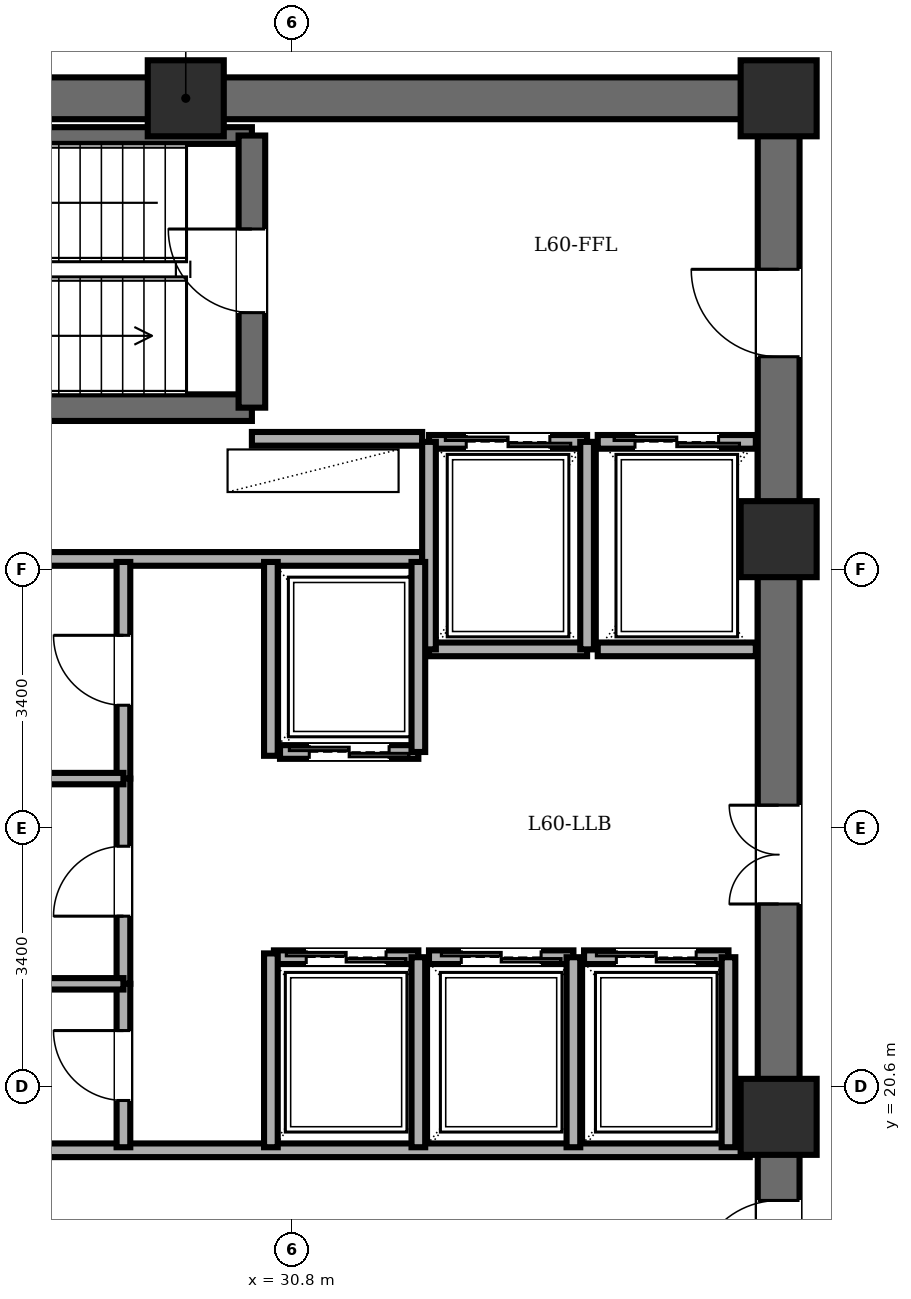
"""IFC4 building model, lengths in metres.
Left out: names, types, materials, properties, quantities, classifications, styles, units other than length and angle.
Written with IfcOpenShell. Run it as: python <this file> out.ifc"""

import sys

from ifc_helpers import new_model, si_unit, direction, frame, frame_2d, origin, origin_2d, place, context, subcontext, project, spatial, rectangle, extrude, element, fill, save


model = new_model("IFC4")
c1 = context("Model", 3, precision=1e-05, world=origin(), true_north=direction((0.0, 1.0)))
c2 = subcontext(c1, "Body", "Model", "MODEL_VIEW")
j1 = project(units=[si_unit("LENGTHUNIT", "METRE"), si_unit("PLANEANGLEUNIT", "RADIAN")], contexts=[c1])
p1 = place(None, origin())
s1 = spatial("IfcSite", under=j1, at=p1, CompositionType="ELEMENT")
p2 = place(p1, origin())
s2 = spatial("IfcBuilding", under=s1, at=p2, CompositionType="ELEMENT")
p3 = place(p2, frame((0.0, 0.0, 230.1)))
s3 = spatial("IfcBuildingStorey", under=s2, at=p3, CompositionType="ELEMENT", Elevation=230.1)
for number, where, z_axis, x_axis in (
    (1, (37.2, 20.2, 0.0), (0.0, 0.0, 1.0), (1.0, 0.0, 0.0)),
    (2, (37.2, 27.8, 0.0), (0.0, 0.0, 1.0), (1.0, 0.0, 0.0)),
    (3, (37.2, 33.6, 0.0), (0.0, 0.0, 1.0), (1.0, 0.0, 0.0)),
    (4, (29.4, 33.6, 0.0), (0.0, 0.0, 1.0), (1.0, 0.0, 0.0)),
):
    element("IfcColumn", number, at=place(p3, frame(where, z_axis=z_axis, x_axis=x_axis)), inside=s3, PredefinedType="COLUMN", context=c2, shape_type="SweptSolid", body=[
        extrude(rectangle(XDim=1.0, YDim=1.0, at=origin_2d()), origin(), (0.0, 0.0, 1.0), 3.6),
    ])
p4 = place(p3, frame((21.6, 33.6, 0.0), z_axis=(0.0, 0.0, 1.0), x_axis=(1.0, 0.0, 0.0)))
e5 = element("IfcWall", 5, at=p4, inside=s3, PredefinedType="SHEAR", context=c2, shape_type="SweptSolid", body=[
    extrude(rectangle(XDim=15.6, YDim=0.55, at=frame_2d((7.8, 0.0))), origin(), (0.0, 0.0, 1.0), 3.4),
])
p5 = place(p3, frame((37.2, 14.4, 0.0), z_axis=(0.0, 0.0, 1.0), x_axis=(0.0, 1.0, 0.0)))
e6 = element("IfcWall", 6, at=p5, inside=s3, PredefinedType="SHEAR", context=c2, shape_type="SweptSolid", body=[
    extrude(rectangle(XDim=19.2, YDim=0.55, at=frame_2d((9.6, 0.0))), origin(), (0.0, 0.0, 1.0), 3.4),
])
p6 = place(p5, frame((15.8, 0.0, 0.0)))
e7 = element("IfcOpeningElement", 7, at=p6, cuts=e6, PredefinedType="OPENING", context=c2, shape_type="SweptSolid", body=[
    extrude(rectangle(XDim=1.15, YDim=2.15, at=frame_2d((0.575, 1.075))), frame((0.0, 0.285, 0.0), z_axis=(0.0, -1.0, 0.0), x_axis=(1.0, 0.0, 0.0)), (0.0, 0.0, 1.0), 0.57),
])
p7 = place(p5, frame((3.6, 0.0, 0.0)))
e8 = element("IfcOpeningElement", 8, at=p7, cuts=e6, PredefinedType="OPENING", context=c2, shape_type="SweptSolid", body=[
    extrude(rectangle(XDim=1.1, YDim=2.15, at=frame_2d((0.55, 1.075))), frame((0.0, 0.285, 0.0), z_axis=(0.0, -1.0, 0.0), x_axis=(1.0, 0.0, 0.0)), (0.0, 0.0, 1.0), 0.57),
])
p8 = place(p5, frame((8.6, 0.0, 0.0)))
e9 = element("IfcOpeningElement", 9, at=p8, cuts=e6, PredefinedType="OPENING", context=c2, shape_type="SweptSolid", body=[
    extrude(rectangle(XDim=1.3, YDim=2.2, at=frame_2d((0.65, 1.1))), frame((0.0, 0.285, 0.0), z_axis=(0.0, -1.0, 0.0), x_axis=(1.0, 0.0, 0.0)), (0.0, 0.0, 1.0), 0.57),
])
p9 = place(p3, frame((22.48, 29.53, 0.0), z_axis=(0.0, 0.0, 1.0), x_axis=(1.0, 0.0, 0.0)))
e10 = element("IfcWall", 10, at=p9, inside=s3, PredefinedType="SOLIDWALL", context=c2, shape_type="SweptSolid", body=[
    extrude(rectangle(XDim=7.79, YDim=0.35, at=frame_2d((3.895, 0.0))), origin(), (0.0, 0.0, 1.0), 3.4),
])
p10 = place(p3, frame((22.48, 33.11, 0.0), z_axis=(0.0, 0.0, 1.0), x_axis=(1.0, 0.0, 0.0)))
e11 = element("IfcWall", 11, at=p10, inside=s3, PredefinedType="PARTITIONING", context=c2, shape_type="SweptSolid", body=[
    extrude(rectangle(XDim=7.79, YDim=0.22, at=frame_2d((3.895, 0.0))), origin(), (0.0, 0.0, 1.0), 3.4),
])
p11 = place(p3, frame((30.27, 29.53, 0.0), z_axis=(0.0, 0.0, 1.0), x_axis=(0.0, 1.0, 0.0)))
e12 = element("IfcWall", 12, at=p11, inside=s3, PredefinedType="SOLIDWALL", context=c2, shape_type="SweptSolid", body=[
    extrude(rectangle(XDim=3.58, YDim=0.35, at=frame_2d((1.79, 0.0))), origin(), (0.0, 0.0, 1.0), 3.4),
])
p12 = place(p11, frame((1.25, 0.0, 0.0)))
e13 = element("IfcOpeningElement", 13, at=p12, cuts=e12, PredefinedType="OPENING", context=c2, shape_type="SweptSolid", body=[
    extrude(rectangle(XDim=1.1, YDim=2.15, at=frame_2d((0.55, 1.075))), frame((0.0, 0.185, 0.0), z_axis=(0.0, -1.0, 0.0), x_axis=(1.0, 0.0, 0.0)), (0.0, 0.0, 1.0), 0.37),
])
p13 = place(p3, frame((30.27, 29.12, 0.0), z_axis=(0.0, 0.0, 1.0), x_axis=(1.0, 0.0, 0.0)))
e14 = element("IfcWall", 14, at=p13, inside=s3, PredefinedType="PARTITIONING", context=c2, shape_type="SweptSolid", body=[
    extrude(rectangle(XDim=2.24, YDim=0.18, at=frame_2d((1.12, 0.0))), origin(), (0.0, 0.0, 1.0), 3.4),
])
p14 = place(p3, frame((21.95, 27.54, 0.0), z_axis=(0.0, 0.0, 1.0), x_axis=(1.0, 0.0, 0.0)))
e15 = element("IfcWall", 15, at=p14, inside=s3, PredefinedType="PARTITIONING", context=c2, shape_type="SweptSolid", body=[
    extrude(rectangle(XDim=10.56, YDim=0.18, at=frame_2d((5.28, 0.0))), origin(), (0.0, 0.0, 1.0), 3.4),
])
p15 = place(p3, frame((21.95, 19.76, 0.0), z_axis=(0.0, 0.0, 1.0), x_axis=(1.0, 0.0, 0.0)))
e16 = element("IfcWall", 16, at=p15, inside=s3, PredefinedType="PARTITIONING", context=c2, shape_type="SweptSolid", body=[
    extrude(rectangle(XDim=14.87, YDim=0.18, at=frame_2d((7.435, 0.0))), origin(), (0.0, 0.0, 1.0), 3.4),
])
p16 = place(p3, frame((32.6, 29.08, 0.0), z_axis=(0.0, 0.0, 1.0), x_axis=(1.0, 0.0, 0.0)))
e17 = element("IfcWall", 17, at=p16, inside=s3, PredefinedType="PARTITIONING", context=c2, shape_type="SweptSolid", body=[
    extrude(rectangle(XDim=2.08, YDim=0.18, at=frame_2d((1.04, 0.0))), origin(), (0.0, 0.0, 1.0), 3.4),
])
p17 = place(p16, frame((0.49, 0.0, 0.0)))
e18 = element("IfcOpeningElement", 18, at=p17, cuts=e17, PredefinedType="OPENING", context=c2, shape_type="SweptSolid", body=[
    extrude(rectangle(XDim=1.1, YDim=2.2, at=frame_2d((0.55, 1.1))), frame((0.0, 0.1, 0.0), z_axis=(0.0, -1.0, 0.0), x_axis=(1.0, 0.0, 0.0)), (0.0, 0.0, 1.0), 0.2),
])
p18 = place(p3, frame((34.68, 26.35, 0.0), z_axis=(0.0, 0.0, 1.0), x_axis=(-1.0, 0.0, 0.0)))
e19 = element("IfcWall", 19, at=p18, inside=s3, PredefinedType="PARTITIONING", context=c2, shape_type="SweptSolid", body=[
    extrude(rectangle(XDim=2.08, YDim=0.18, at=frame_2d((1.04, 0.0))), origin(), (0.0, 0.0, 1.0), 3.4),
])
for number, where, z_axis, x_axis in (
    (20, (34.68, 26.35, 0.0), (0.0, 0.0, 1.0), (0.0, 1.0, 0.0)),
    (21, (32.6, 29.08, 0.0), (0.0, 0.0, 1.0), (0.0, -1.0, 0.0)),
):
    element("IfcWall", number, at=place(p3, frame(where, z_axis=z_axis, x_axis=x_axis)), inside=s3, PredefinedType="PARTITIONING", context=c2, shape_type="SweptSolid", body=[
        extrude(rectangle(XDim=2.73, YDim=0.18, at=frame_2d((1.365, 0.0))), origin(), (0.0, 0.0, 1.0), 3.4),
    ])
p19 = place(p3, frame((34.82, 29.08, 0.0), z_axis=(0.0, 0.0, 1.0), x_axis=(1.0, 0.0, 0.0)))
e22 = element("IfcWall", 22, at=p19, inside=s3, PredefinedType="PARTITIONING", context=c2, shape_type="SweptSolid", body=[
    extrude(rectangle(XDim=2.08, YDim=0.18, at=frame_2d((1.04, 0.0))), origin(), (0.0, 0.0, 1.0), 3.4),
])
p20 = place(p19, frame((0.49, 0.0, 0.0)))
e23 = element("IfcOpeningElement", 23, at=p20, cuts=e22, PredefinedType="OPENING", context=c2, shape_type="SweptSolid", body=[
    extrude(rectangle(XDim=1.1, YDim=2.2, at=frame_2d((0.55, 1.1))), frame((0.0, 0.1, 0.0), z_axis=(0.0, -1.0, 0.0), x_axis=(1.0, 0.0, 0.0)), (0.0, 0.0, 1.0), 0.2),
])
p21 = place(p3, frame((36.9, 26.35, 0.0), z_axis=(0.0, 0.0, 1.0), x_axis=(-1.0, 0.0, 0.0)))
e24 = element("IfcWall", 24, at=p21, inside=s3, PredefinedType="PARTITIONING", context=c2, shape_type="SweptSolid", body=[
    extrude(rectangle(XDim=2.08, YDim=0.18, at=frame_2d((1.04, 0.0))), origin(), (0.0, 0.0, 1.0), 3.4),
])
p22 = place(p3, frame((32.46, 25.0, 0.0), z_axis=(0.0, 0.0, 1.0), x_axis=(-1.0, 0.0, 0.0)))
e25 = element("IfcWall", 25, at=p22, inside=s3, PredefinedType="PARTITIONING", context=c2, shape_type="SweptSolid", body=[
    extrude(rectangle(XDim=1.82, YDim=0.18, at=frame_2d((0.91, 0.0))), origin(), (0.0, 0.0, 1.0), 3.4),
])
p23 = place(p22, frame((0.385, 0.0, 0.0)))
e26 = element("IfcOpeningElement", 26, at=p23, cuts=e25, PredefinedType="OPENING", context=c2, shape_type="SweptSolid", body=[
    extrude(rectangle(XDim=1.05, YDim=2.2, at=frame_2d((0.525, 1.1))), frame((0.0, 0.1, 0.0), z_axis=(0.0, -1.0, 0.0), x_axis=(1.0, 0.0, 0.0)), (0.0, 0.0, 1.0), 0.2),
])
p24 = place(p3, frame((32.46, 25.0, 0.0), z_axis=(0.0, 0.0, 1.0), x_axis=(0.0, 1.0, 0.0)))
e27 = element("IfcWall", 27, at=p24, inside=s3, PredefinedType="PARTITIONING", context=c2, shape_type="SweptSolid", body=[
    extrude(rectangle(XDim=2.5, YDim=0.18, at=frame_2d((1.25, 0.0))), origin(), (0.0, 0.0, 1.0), 3.4),
])
p25 = place(p3, frame((30.56, 22.3, 0.0), z_axis=(0.0, 0.0, 1.0), x_axis=(1.0, 0.0, 0.0)))
e28 = element("IfcWall", 28, at=p25, inside=s3, PredefinedType="PARTITIONING", context=c2, shape_type="SweptSolid", body=[
    extrude(rectangle(XDim=1.9, YDim=0.18, at=frame_2d((0.95, 0.0))), origin(), (0.0, 0.0, 1.0), 3.4),
])
p26 = place(p25, frame((0.425, 0.0, 0.0)))
e29 = element("IfcOpeningElement", 29, at=p26, cuts=e28, PredefinedType="OPENING", context=c2, shape_type="SweptSolid", body=[
    extrude(rectangle(XDim=1.05, YDim=2.2, at=frame_2d((0.525, 1.1))), frame((0.0, 0.1, 0.0), z_axis=(0.0, -1.0, 0.0), x_axis=(1.0, 0.0, 0.0)), (0.0, 0.0, 1.0), 0.2),
])
p27 = place(p3, frame((32.46, 19.8, 0.0), z_axis=(0.0, 0.0, 1.0), x_axis=(0.0, 1.0, 0.0)))
e30 = element("IfcWall", 30, at=p27, inside=s3, PredefinedType="PARTITIONING", context=c2, shape_type="SweptSolid", body=[
    extrude(rectangle(XDim=2.5, YDim=0.18, at=frame_2d((1.25, 0.0))), origin(), (0.0, 0.0, 1.0), 3.4),
])
p28 = place(p3, frame((32.6, 22.3, 0.0), z_axis=(0.0, 0.0, 1.0), x_axis=(1.0, 0.0, 0.0)))
e31 = element("IfcWall", 31, at=p28, inside=s3, PredefinedType="PARTITIONING", context=c2, shape_type="SweptSolid", body=[
    extrude(rectangle(XDim=1.9, YDim=0.18, at=frame_2d((0.95, 0.0))), origin(), (0.0, 0.0, 1.0), 3.4),
])
p29 = place(p28, frame((0.425, 0.0, 0.0)))
e32 = element("IfcOpeningElement", 32, at=p29, cuts=e31, PredefinedType="OPENING", context=c2, shape_type="SweptSolid", body=[
    extrude(rectangle(XDim=1.05, YDim=2.2, at=frame_2d((0.525, 1.1))), frame((0.0, 0.1, 0.0), z_axis=(0.0, -1.0, 0.0), x_axis=(1.0, 0.0, 0.0)), (0.0, 0.0, 1.0), 0.2),
])
p30 = place(p3, frame((34.5, 19.8, 0.0), z_axis=(0.0, 0.0, 1.0), x_axis=(0.0, 1.0, 0.0)))
e33 = element("IfcWall", 33, at=p30, inside=s3, PredefinedType="PARTITIONING", context=c2, shape_type="SweptSolid", body=[
    extrude(rectangle(XDim=2.5, YDim=0.18, at=frame_2d((1.25, 0.0))), origin(), (0.0, 0.0, 1.0), 3.4),
])
p31 = place(p3, frame((34.64, 22.3, 0.0), z_axis=(0.0, 0.0, 1.0), x_axis=(1.0, 0.0, 0.0)))
e34 = element("IfcWall", 34, at=p31, inside=s3, PredefinedType="PARTITIONING", context=c2, shape_type="SweptSolid", body=[
    extrude(rectangle(XDim=1.9, YDim=0.18, at=frame_2d((0.95, 0.0))), origin(), (0.0, 0.0, 1.0), 3.4),
])
p32 = place(p31, frame((0.425, 0.0, 0.0)))
e35 = element("IfcOpeningElement", 35, at=p32, cuts=e34, PredefinedType="OPENING", context=c2, shape_type="SweptSolid", body=[
    extrude(rectangle(XDim=1.05, YDim=2.2, at=frame_2d((0.525, 1.1))), frame((0.0, 0.1, 0.0), z_axis=(0.0, -1.0, 0.0), x_axis=(1.0, 0.0, 0.0)), (0.0, 0.0, 1.0), 0.2),
])
p33 = place(p3, frame((36.54, 19.8, 0.0), z_axis=(0.0, 0.0, 1.0), x_axis=(0.0, 1.0, 0.0)))
e36 = element("IfcWall", 36, at=p33, inside=s3, PredefinedType="PARTITIONING", context=c2, shape_type="SweptSolid", body=[
    extrude(rectangle(XDim=2.5, YDim=0.18, at=frame_2d((1.25, 0.0))), origin(), (0.0, 0.0, 1.0), 3.4),
])
for number, where, z_axis, x_axis in (
    (37, (30.52, 24.95, 0.0), (0.0, 0.0, 1.0), (0.0, 1.0, 0.0)),
    (38, (30.52, 19.8, 0.0), (0.0, 0.0, 1.0), (0.0, 1.0, 0.0)),
):
    element("IfcWall", number, at=place(p3, frame(where, z_axis=z_axis, x_axis=x_axis)), inside=s3, PredefinedType="PARTITIONING", context=c2, shape_type="SweptSolid", body=[
        extrude(rectangle(XDim=2.55, YDim=0.18, at=frame_2d((1.275, 0.0))), origin(), (0.0, 0.0, 1.0), 3.4),
    ])
p34 = place(p3, frame((28.58, 24.65, 0.0), z_axis=(0.0, 0.0, 1.0), x_axis=(0.0, 1.0, 0.0)))
e39 = element("IfcWall", 39, at=p34, inside=s3, PredefinedType="PARTITIONING", context=c2, shape_type="SweptSolid", body=[
    extrude(rectangle(XDim=2.85, YDim=0.18, at=frame_2d((1.425, 0.0))), origin(), (0.0, 0.0, 1.0), 3.4),
])
p35 = place(p34, frame((0.965, 0.0, 0.0)))
e40 = element("IfcOpeningElement", 40, at=p35, cuts=e39, PredefinedType="OPENING", context=c2, shape_type="SweptSolid", body=[
    extrude(rectangle(XDim=0.92, YDim=2.1, at=frame_2d((0.46, 1.05))), frame((0.0, 0.1, 0.0), z_axis=(0.0, -1.0, 0.0), x_axis=(1.0, 0.0, 0.0)), (0.0, 0.0, 1.0), 0.2),
])
p36 = place(p3, frame((28.58, 21.95, 0.0), z_axis=(0.0, 0.0, 1.0), x_axis=(0.0, 1.0, 0.0)))
e41 = element("IfcWall", 41, at=p36, inside=s3, PredefinedType="PARTITIONING", context=c2, shape_type="SweptSolid", body=[
    extrude(rectangle(XDim=2.7, YDim=0.18, at=frame_2d((1.35, 0.0))), origin(), (0.0, 0.0, 1.0), 3.4),
])
p37 = place(p36, frame((0.89, 0.0, 0.0)))
e42 = element("IfcOpeningElement", 42, at=p37, cuts=e41, PredefinedType="OPENING", context=c2, shape_type="SweptSolid", body=[
    extrude(rectangle(XDim=0.92, YDim=2.1, at=frame_2d((0.46, 1.05))), frame((0.0, 0.1, 0.0), z_axis=(0.0, -1.0, 0.0), x_axis=(1.0, 0.0, 0.0)), (0.0, 0.0, 1.0), 0.2),
])
p38 = place(p3, frame((28.58, 19.8, 0.0), z_axis=(0.0, 0.0, 1.0), x_axis=(0.0, 1.0, 0.0)))
e43 = element("IfcWall", 43, at=p38, inside=s3, PredefinedType="PARTITIONING", context=c2, shape_type="SweptSolid", body=[
    extrude(rectangle(XDim=2.15, YDim=0.18, at=frame_2d((1.075, 0.0))), origin(), (0.0, 0.0, 1.0), 3.4),
])
p39 = place(p38, frame((0.615, 0.0, 0.0)))
e44 = element("IfcOpeningElement", 44, at=p39, cuts=e43, PredefinedType="OPENING", context=c2, shape_type="SweptSolid", body=[
    extrude(rectangle(XDim=0.92, YDim=2.1, at=frame_2d((0.46, 1.05))), frame((0.0, 0.1, 0.0), z_axis=(0.0, -1.0, 0.0), x_axis=(1.0, 0.0, 0.0)), (0.0, 0.0, 1.0), 0.2),
])
for number, where, z_axis, x_axis in (
    (45, (21.95, 24.65, 0.0), (0.0, 0.0, 1.0), (1.0, 0.0, 0.0)),
    (46, (21.95, 21.95, 0.0), (0.0, 0.0, 1.0), (1.0, 0.0, 0.0)),
):
    element("IfcWall", number, at=place(p3, frame(where, z_axis=z_axis, x_axis=x_axis)), inside=s3, PredefinedType="PARTITIONING", context=c2, shape_type="SweptSolid", body=[
        extrude(rectangle(XDim=6.63, YDim=0.15, at=frame_2d((3.315, 0.0))), origin(), (0.0, 0.0, 1.0), 3.4),
    ])
p40 = place(p12, origin())
e47 = element("IfcDoor", 47, at=p40, inside=s3, OperationType="SINGLE_SWING_RIGHT", PredefinedType="DOOR", context=c2, shape_type="SweptSolid", body=[
    extrude(rectangle(XDim=1.1, YDim=2.15, at=frame_2d((0.55, 1.075))), frame((0.0, 0.025, 0.0), z_axis=(0.0, -1.0, 0.0), x_axis=(1.0, 0.0, 0.0)), (0.0, 0.0, 1.0), 0.05),
])
fill(e13, e47)
p41 = place(p6, origin())
e48 = element("IfcDoor", 48, at=p41, inside=s3, OperationType="SINGLE_SWING_RIGHT", PredefinedType="DOOR", context=c2, shape_type="SweptSolid", body=[
    extrude(rectangle(XDim=1.15, YDim=2.15, at=frame_2d((0.575, 1.075))), frame((0.0, 0.025, 0.0), z_axis=(0.0, -1.0, 0.0), x_axis=(1.0, 0.0, 0.0)), (0.0, 0.0, 1.0), 0.05),
])
fill(e7, e48)
p42 = place(p7, origin())
e49 = element("IfcDoor", 49, at=p42, inside=s3, OperationType="SINGLE_SWING_LEFT", PredefinedType="DOOR", context=c2, shape_type="SweptSolid", body=[
    extrude(rectangle(XDim=1.1, YDim=2.15, at=frame_2d((0.55, 1.075))), frame((0.0, 0.025, 0.0), z_axis=(0.0, -1.0, 0.0), x_axis=(1.0, 0.0, 0.0)), (0.0, 0.0, 1.0), 0.05),
])
fill(e8, e49)
p43 = place(p17, origin())
e50 = element("IfcDoor", 50, at=p43, inside=s3, OperationType="DOUBLE_DOOR_SLIDING", PredefinedType="DOOR", context=c2, shape_type="SweptSolid", body=[
    extrude(rectangle(XDim=1.1, YDim=2.2, at=frame_2d((0.55, 1.1))), frame((0.0, 0.025, 0.0), z_axis=(0.0, -1.0, 0.0), x_axis=(1.0, 0.0, 0.0)), (0.0, 0.0, 1.0), 0.05),
])
fill(e18, e50)
p44 = place(p20, origin())
e51 = element("IfcDoor", 51, at=p44, inside=s3, OperationType="DOUBLE_DOOR_SLIDING", PredefinedType="DOOR", context=c2, shape_type="SweptSolid", body=[
    extrude(rectangle(XDim=1.1, YDim=2.2, at=frame_2d((0.55, 1.1))), frame((0.0, 0.025, 0.0), z_axis=(0.0, -1.0, 0.0), x_axis=(1.0, 0.0, 0.0)), (0.0, 0.0, 1.0), 0.05),
])
fill(e23, e51)
p45 = place(p23, origin())
e52 = element("IfcDoor", 52, at=p45, inside=s3, OperationType="DOUBLE_DOOR_SLIDING", PredefinedType="DOOR", context=c2, shape_type="SweptSolid", body=[
    extrude(rectangle(XDim=1.05, YDim=2.2, at=frame_2d((0.525, 1.1))), frame((0.0, 0.025, 0.0), z_axis=(0.0, -1.0, 0.0), x_axis=(1.0, 0.0, 0.0)), (0.0, 0.0, 1.0), 0.05),
])
fill(e26, e52)
p46 = place(p26, origin())
e53 = element("IfcDoor", 53, at=p46, inside=s3, OperationType="DOUBLE_DOOR_SLIDING", PredefinedType="DOOR", context=c2, shape_type="SweptSolid", body=[
    extrude(rectangle(XDim=1.05, YDim=2.2, at=frame_2d((0.525, 1.1))), frame((0.0, 0.025, 0.0), z_axis=(0.0, -1.0, 0.0), x_axis=(1.0, 0.0, 0.0)), (0.0, 0.0, 1.0), 0.05),
])
fill(e29, e53)
p47 = place(p29, origin())
e54 = element("IfcDoor", 54, at=p47, inside=s3, OperationType="DOUBLE_DOOR_SLIDING", PredefinedType="DOOR", context=c2, shape_type="SweptSolid", body=[
    extrude(rectangle(XDim=1.05, YDim=2.2, at=frame_2d((0.525, 1.1))), frame((0.0, 0.025, 0.0), z_axis=(0.0, -1.0, 0.0), x_axis=(1.0, 0.0, 0.0)), (0.0, 0.0, 1.0), 0.05),
])
fill(e32, e54)
p48 = place(p32, origin())
e55 = element("IfcDoor", 55, at=p48, inside=s3, OperationType="DOUBLE_DOOR_SLIDING", PredefinedType="DOOR", context=c2, shape_type="SweptSolid", body=[
    extrude(rectangle(XDim=1.05, YDim=2.2, at=frame_2d((0.525, 1.1))), frame((0.0, 0.025, 0.0), z_axis=(0.0, -1.0, 0.0), x_axis=(1.0, 0.0, 0.0)), (0.0, 0.0, 1.0), 0.05),
])
fill(e35, e55)
p49 = place(p35, origin())
e56 = element("IfcDoor", 56, at=p49, inside=s3, OperationType="SINGLE_SWING_RIGHT", PredefinedType="DOOR", context=c2, shape_type="SweptSolid", body=[
    extrude(rectangle(XDim=0.92, YDim=2.1, at=frame_2d((0.46, 1.05))), frame((0.0, 0.025, 0.0), z_axis=(0.0, -1.0, 0.0), x_axis=(1.0, 0.0, 0.0)), (0.0, 0.0, 1.0), 0.05),
])
fill(e40, e56)
p50 = place(p37, origin())
e57 = element("IfcDoor", 57, at=p50, inside=s3, OperationType="SINGLE_SWING_LEFT", PredefinedType="DOOR", context=c2, shape_type="SweptSolid", body=[
    extrude(rectangle(XDim=0.92, YDim=2.1, at=frame_2d((0.46, 1.05))), frame((0.0, 0.025, 0.0), z_axis=(0.0, -1.0, 0.0), x_axis=(1.0, 0.0, 0.0)), (0.0, 0.0, 1.0), 0.05),
])
fill(e42, e57)
p51 = place(p39, origin())
e58 = element("IfcDoor", 58, at=p51, inside=s3, OperationType="SINGLE_SWING_RIGHT", PredefinedType="DOOR", context=c2, shape_type="SweptSolid", body=[
    extrude(rectangle(XDim=0.92, YDim=2.1, at=frame_2d((0.46, 1.05))), frame((0.0, 0.025, 0.0), z_axis=(0.0, -1.0, 0.0), x_axis=(1.0, 0.0, 0.0)), (0.0, 0.0, 1.0), 0.05),
])
fill(e44, e58)
p52 = place(p8, origin())
e59 = element("IfcDoor", 59, at=p52, inside=s3, OperationType="DOUBLE_DOOR_SINGLE_SWING", PredefinedType="DOOR", context=c2, shape_type="SweptSolid", body=[
    extrude(rectangle(XDim=1.3, YDim=2.2, at=frame_2d((0.65, 1.1))), frame((0.0, 0.025, 0.0), z_axis=(0.0, -1.0, 0.0), x_axis=(1.0, 0.0, 0.0)), (0.0, 0.0, 1.0), 0.05),
])
fill(e9, e59)
save(model, sys.argv[1])
